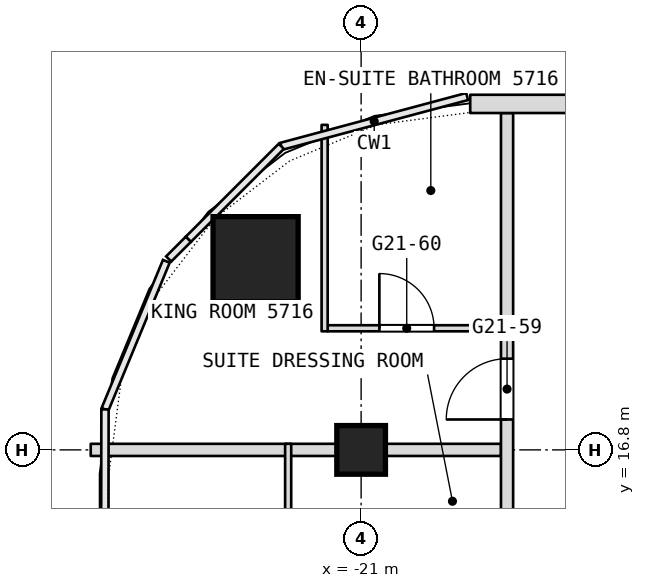
"""IFC4 building model, lengths in metres.
Left out: names, types, materials, properties, quantities, classifications, styles, units other than length and angle.
Written with IfcOpenShell. Run it as: python <this file> out.ifc"""

import sys

from ifc_helpers import new_model, si_unit, direction, frame, frame_2d, origin, origin_2d, place, context, subcontext, project, spatial, rectangle, extrude, element, fill, save


model = new_model("IFC4")
c1 = context("Model", 3, precision=1e-05, world=origin(), true_north=direction((0.0, 1.0)))
c2 = subcontext(c1, "Body", "Model", "MODEL_VIEW")
j1 = project(units=[si_unit("LENGTHUNIT", "METRE"), si_unit("PLANEANGLEUNIT", "RADIAN")], contexts=[c1])
p1 = place(None, origin())
s1 = spatial("IfcSite", under=j1, at=p1, CompositionType="ELEMENT")
p2 = place(p1, origin())
s2 = spatial("IfcBuilding", under=s1, at=p2, CompositionType="ELEMENT")
p3 = place(p2, frame((0.0, 0.0, 241.7)))
s3 = spatial("IfcBuildingStorey", under=s2, at=p3, CompositionType="ELEMENT", Elevation=241.7)
p4 = place(p3, frame((-22.736, 19.936, 0.0), z_axis=(0.0, 0.0, 1.0), x_axis=(1.0, 0.0, 0.0)))
e1 = element("IfcColumn", 1, at=p4, inside=s3, PredefinedType="COLUMN", context=c2, shape_type="SweptSolid", body=[
    extrude(rectangle(XDim=1.4, YDim=1.4, at=origin_2d()), origin(), (0.0, 0.0, 1.0), 3.6),
])
p5 = place(p3, frame((-21.0, 16.8, 0.0), z_axis=(0.0, 0.0, 1.0), x_axis=(1.0, 0.0, 0.0)))
e2 = element("IfcColumn", 2, at=p5, inside=s3, PredefinedType="COLUMN", context=c2, shape_type="SweptSolid", body=[
    extrude(rectangle(XDim=0.8, YDim=0.8, at=origin_2d()), origin(), (0.0, 0.0, 1.0), 3.6),
])
p6 = place(p3, frame((-25.447, 16.8, 0.0), z_axis=(0.0, 0.0, 1.0), x_axis=(1.0, 0.0, 0.0)))
e3 = element("IfcWall", 3, at=p6, inside=s3, PredefinedType="PARTITIONING", context=c2, shape_type="SweptSolid", body=[
    extrude(rectangle(XDim=6.747, YDim=0.2, at=frame_2d((3.374, 0.0))), origin(), (0.0, 0.0, 1.0), 2.94),
])
p7 = place(p3, frame((-18.6, -26.751, 0.0), z_axis=(0.0, 0.0, 1.0), x_axis=(0.0, 1.0, 0.0)))
e4 = element("IfcWall", 4, at=p7, inside=s3, PredefinedType="PARTITIONING", context=c2, shape_type="SweptSolid", body=[
    extrude(rectangle(XDim=49.091, YDim=0.2, at=frame_2d((24.545, 0.0))), origin(), (0.0, 0.0, 1.0), 3.34),
])
p8 = place(p7, frame((4.576, 0.0, 0.0)))
e5 = element("IfcOpeningElement", 5, at=p8, cuts=e4, PredefinedType="OPENING", context=c2, shape_type="SweptSolid", body=[
    extrude(rectangle(XDim=1.1, YDim=2.1, at=frame_2d((0.55, 1.05))), frame((0.0, 0.1, 0.0), z_axis=(0.0, -1.0, 0.0), x_axis=(1.0, 0.0, 0.0)), (0.0, 0.0, 1.0), 0.2),
])
p9 = place(p7, frame((13.551, 0.0, 0.0)))
e6 = element("IfcOpeningElement", 6, at=p9, cuts=e4, PredefinedType="OPENING", context=c2, shape_type="SweptSolid", body=[
    extrude(rectangle(XDim=1.1, YDim=2.1, at=frame_2d((0.55, 1.05))), frame((0.0, 0.1, 0.0), z_axis=(0.0, -1.0, 0.0), x_axis=(1.0, 0.0, 0.0)), (0.0, 0.0, 1.0), 0.2),
])
p10 = place(p7, frame((22.051, 0.0, 0.0)))
e7 = element("IfcOpeningElement", 7, at=p10, cuts=e4, PredefinedType="OPENING", context=c2, shape_type="SweptSolid", body=[
    extrude(rectangle(XDim=1.1, YDim=2.1, at=frame_2d((0.55, 1.05))), frame((0.0, 0.1, 0.0), z_axis=(0.0, -1.0, 0.0), x_axis=(1.0, 0.0, 0.0)), (0.0, 0.0, 1.0), 0.2),
])
p11 = place(p7, frame((30.351, 0.0, 0.0)))
e8 = element("IfcOpeningElement", 8, at=p11, cuts=e4, PredefinedType="OPENING", context=c2, shape_type="SweptSolid", body=[
    extrude(rectangle(XDim=1.1, YDim=2.1, at=frame_2d((0.55, 1.05))), frame((0.0, 0.1, 0.0), z_axis=(0.0, -1.0, 0.0), x_axis=(1.0, 0.0, 0.0)), (0.0, 0.0, 1.0), 0.2),
])
p12 = place(p7, frame((38.851, 0.0, 0.0)))
e9 = element("IfcOpeningElement", 9, at=p12, cuts=e4, PredefinedType="OPENING", context=c2, shape_type="SweptSolid", body=[
    extrude(rectangle(XDim=1.1, YDim=2.1, at=frame_2d((0.55, 1.05))), frame((0.0, 0.1, 0.0), z_axis=(0.0, -1.0, 0.0), x_axis=(1.0, 0.0, 0.0)), (0.0, 0.0, 1.0), 0.2),
])
p13 = place(p7, frame((44.051, 0.0, 0.0)))
e10 = element("IfcOpeningElement", 10, at=p13, cuts=e4, PredefinedType="OPENING", context=c2, shape_type="SweptSolid", body=[
    extrude(rectangle(XDim=1.0, YDim=2.1, at=frame_2d((0.5, 1.05))), frame((0.0, 0.1, 0.0), z_axis=(0.0, -1.0, 0.0), x_axis=(1.0, 0.0, 0.0)), (0.0, 0.0, 1.0), 0.2),
])
p14 = place(p3, frame((-21.55, 18.8, 0.0), z_axis=(0.0, 0.0, 1.0), x_axis=(1.0, 0.0, 0.0)))
e11 = element("IfcWall", 11, at=p14, inside=s3, PredefinedType="PARTITIONING", context=c2, shape_type="SweptSolid", body=[
    extrude(rectangle(XDim=2.85, YDim=0.1, at=frame_2d((1.425, 0.0))), origin(), (0.0, 0.0, 1.0), 3.34),
])
p15 = place(p14, frame((0.85, 0.0, 0.0)))
e12 = element("IfcOpeningElement", 12, at=p15, cuts=e11, PredefinedType="OPENING", context=c2, shape_type="SweptSolid", body=[
    extrude(rectangle(XDim=0.9, YDim=2.1, at=frame_2d((0.45, 1.05))), frame((0.0, 0.05, 0.0), z_axis=(0.0, -1.0, 0.0), x_axis=(1.0, 0.0, 0.0)), (0.0, 0.0, 1.0), 0.1),
])
p16 = place(p3, frame((-21.6, 18.75, 0.0), z_axis=(0.0, 0.0, 1.0), x_axis=(0.0, 1.0, 0.0)))
e13 = element("IfcWall", 13, at=p16, inside=s3, PredefinedType="PARTITIONING", context=c2, shape_type="SweptSolid", body=[
    extrude(rectangle(XDim=3.395, YDim=0.1, at=frame_2d((1.698, 0.0))), origin(), (0.0, 0.0, 1.0), 3.34),
])
p17 = place(p3, frame((-22.2, 14.35, 0.0), z_axis=(0.0, 0.0, 1.0), x_axis=(0.0, 1.0, 0.0)))
e14 = element("IfcWall", 14, at=p17, inside=s3, PredefinedType="PARTITIONING", context=c2, shape_type="SweptSolid", body=[
    extrude(rectangle(XDim=2.55, YDim=0.1, at=frame_2d((1.275, 0.0))), origin(), (0.0, 0.0, 1.0), 3.34),
])
p18 = place(p3, frame((19.206, 22.49, 0.0), z_axis=(0.0, 0.0, 1.0), x_axis=(-1.0, 0.0, 0.0)))
e15 = element("IfcWall", 15, at=p18, inside=s3, PredefinedType="NOTDEFINED", context=c2, shape_type="SweptSolid", body=[
    extrude(rectangle(XDim=38.412, YDim=0.3, at=frame_2d((19.206, 0.0))), origin(), (0.0, 0.0, 1.0), 3.6),
])
p19 = place(p18, frame((3.306, 0.0, 0.9)))
e16 = element("IfcOpeningElement", 16, at=p19, cuts=e15, PredefinedType="OPENING", context=c2, shape_type="SweptSolid", body=[
    extrude(rectangle(XDim=2.4, YDim=2.1, at=frame_2d((1.2, 1.05))), frame((0.0, 0.15, 0.0), z_axis=(0.0, -1.0, 0.0), x_axis=(1.0, 0.0, 0.0)), (0.0, 0.0, 1.0), 0.3),
])
p20 = place(p18, frame((7.506, 0.0, 0.9)))
e17 = element("IfcOpeningElement", 17, at=p20, cuts=e15, PredefinedType="OPENING", context=c2, shape_type="SweptSolid", body=[
    extrude(rectangle(XDim=2.4, YDim=2.1, at=frame_2d((1.2, 1.05))), frame((0.0, 0.15, 0.0), z_axis=(0.0, -1.0, 0.0), x_axis=(1.0, 0.0, 0.0)), (0.0, 0.0, 1.0), 0.3),
])
p21 = place(p18, frame((11.706, 0.0, 0.9)))
e18 = element("IfcOpeningElement", 18, at=p21, cuts=e15, PredefinedType="OPENING", context=c2, shape_type="SweptSolid", body=[
    extrude(rectangle(XDim=2.4, YDim=2.1, at=frame_2d((1.2, 1.05))), frame((0.0, 0.15, 0.0), z_axis=(0.0, -1.0, 0.0), x_axis=(1.0, 0.0, 0.0)), (0.0, 0.0, 1.0), 0.3),
])
p22 = place(p18, frame((15.906, 0.0, 0.9)))
e19 = element("IfcOpeningElement", 19, at=p22, cuts=e15, PredefinedType="OPENING", context=c2, shape_type="SweptSolid", body=[
    extrude(rectangle(XDim=2.4, YDim=2.1, at=frame_2d((1.2, 1.05))), frame((0.0, 0.15, 0.0), z_axis=(0.0, -1.0, 0.0), x_axis=(1.0, 0.0, 0.0)), (0.0, 0.0, 1.0), 0.3),
])
p23 = place(p18, frame((20.106, 0.0, 0.9)))
e20 = element("IfcOpeningElement", 20, at=p23, cuts=e15, PredefinedType="OPENING", context=c2, shape_type="SweptSolid", body=[
    extrude(rectangle(XDim=2.4, YDim=2.1, at=frame_2d((1.2, 1.05))), frame((0.0, 0.15, 0.0), z_axis=(0.0, -1.0, 0.0), x_axis=(1.0, 0.0, 0.0)), (0.0, 0.0, 1.0), 0.3),
])
p24 = place(p18, frame((24.306, 0.0, 0.9)))
e21 = element("IfcOpeningElement", 21, at=p24, cuts=e15, PredefinedType="OPENING", context=c2, shape_type="SweptSolid", body=[
    extrude(rectangle(XDim=2.4, YDim=2.1, at=frame_2d((1.2, 1.05))), frame((0.0, 0.15, 0.0), z_axis=(0.0, -1.0, 0.0), x_axis=(1.0, 0.0, 0.0)), (0.0, 0.0, 1.0), 0.3),
])
p25 = place(p18, frame((28.506, 0.0, 0.9)))
e22 = element("IfcOpeningElement", 22, at=p25, cuts=e15, PredefinedType="OPENING", context=c2, shape_type="SweptSolid", body=[
    extrude(rectangle(XDim=2.4, YDim=2.1, at=frame_2d((1.2, 1.05))), frame((0.0, 0.15, 0.0), z_axis=(0.0, -1.0, 0.0), x_axis=(1.0, 0.0, 0.0)), (0.0, 0.0, 1.0), 0.3),
])
p26 = place(p18, frame((32.706, 0.0, 0.9)))
e23 = element("IfcOpeningElement", 23, at=p26, cuts=e15, PredefinedType="OPENING", context=c2, shape_type="SweptSolid", body=[
    extrude(rectangle(XDim=2.4, YDim=2.1, at=frame_2d((1.2, 1.05))), frame((0.0, 0.15, 0.0), z_axis=(0.0, -1.0, 0.0), x_axis=(1.0, 0.0, 0.0)), (0.0, 0.0, 1.0), 0.3),
])
p27 = place(p13, origin())
e24 = element("IfcDoor", 24, at=p27, inside=s3, OperationType="SINGLE_SWING_RIGHT", PredefinedType="DOOR", context=c2, shape_type="SweptSolid", body=[
    extrude(rectangle(XDim=1.0, YDim=2.1, at=frame_2d((0.5, 1.05))), frame((0.0, 0.025, 0.0), z_axis=(0.0, -1.0, 0.0), x_axis=(1.0, 0.0, 0.0)), (0.0, 0.0, 1.0), 0.05),
])
fill(e10, e24)
p28 = place(p15, origin())
e25 = element("IfcDoor", 25, at=p28, inside=s3, OperationType="SINGLE_SWING_LEFT", PredefinedType="DOOR", context=c2, shape_type="SweptSolid", body=[
    extrude(rectangle(XDim=0.9, YDim=2.1, at=frame_2d((0.45, 1.05))), frame((0.0, 0.025, 0.0), z_axis=(0.0, -1.0, 0.0), x_axis=(1.0, 0.0, 0.0)), (0.0, 0.0, 1.0), 0.05),
])
fill(e12, e25)
save(model, sys.argv[1])
